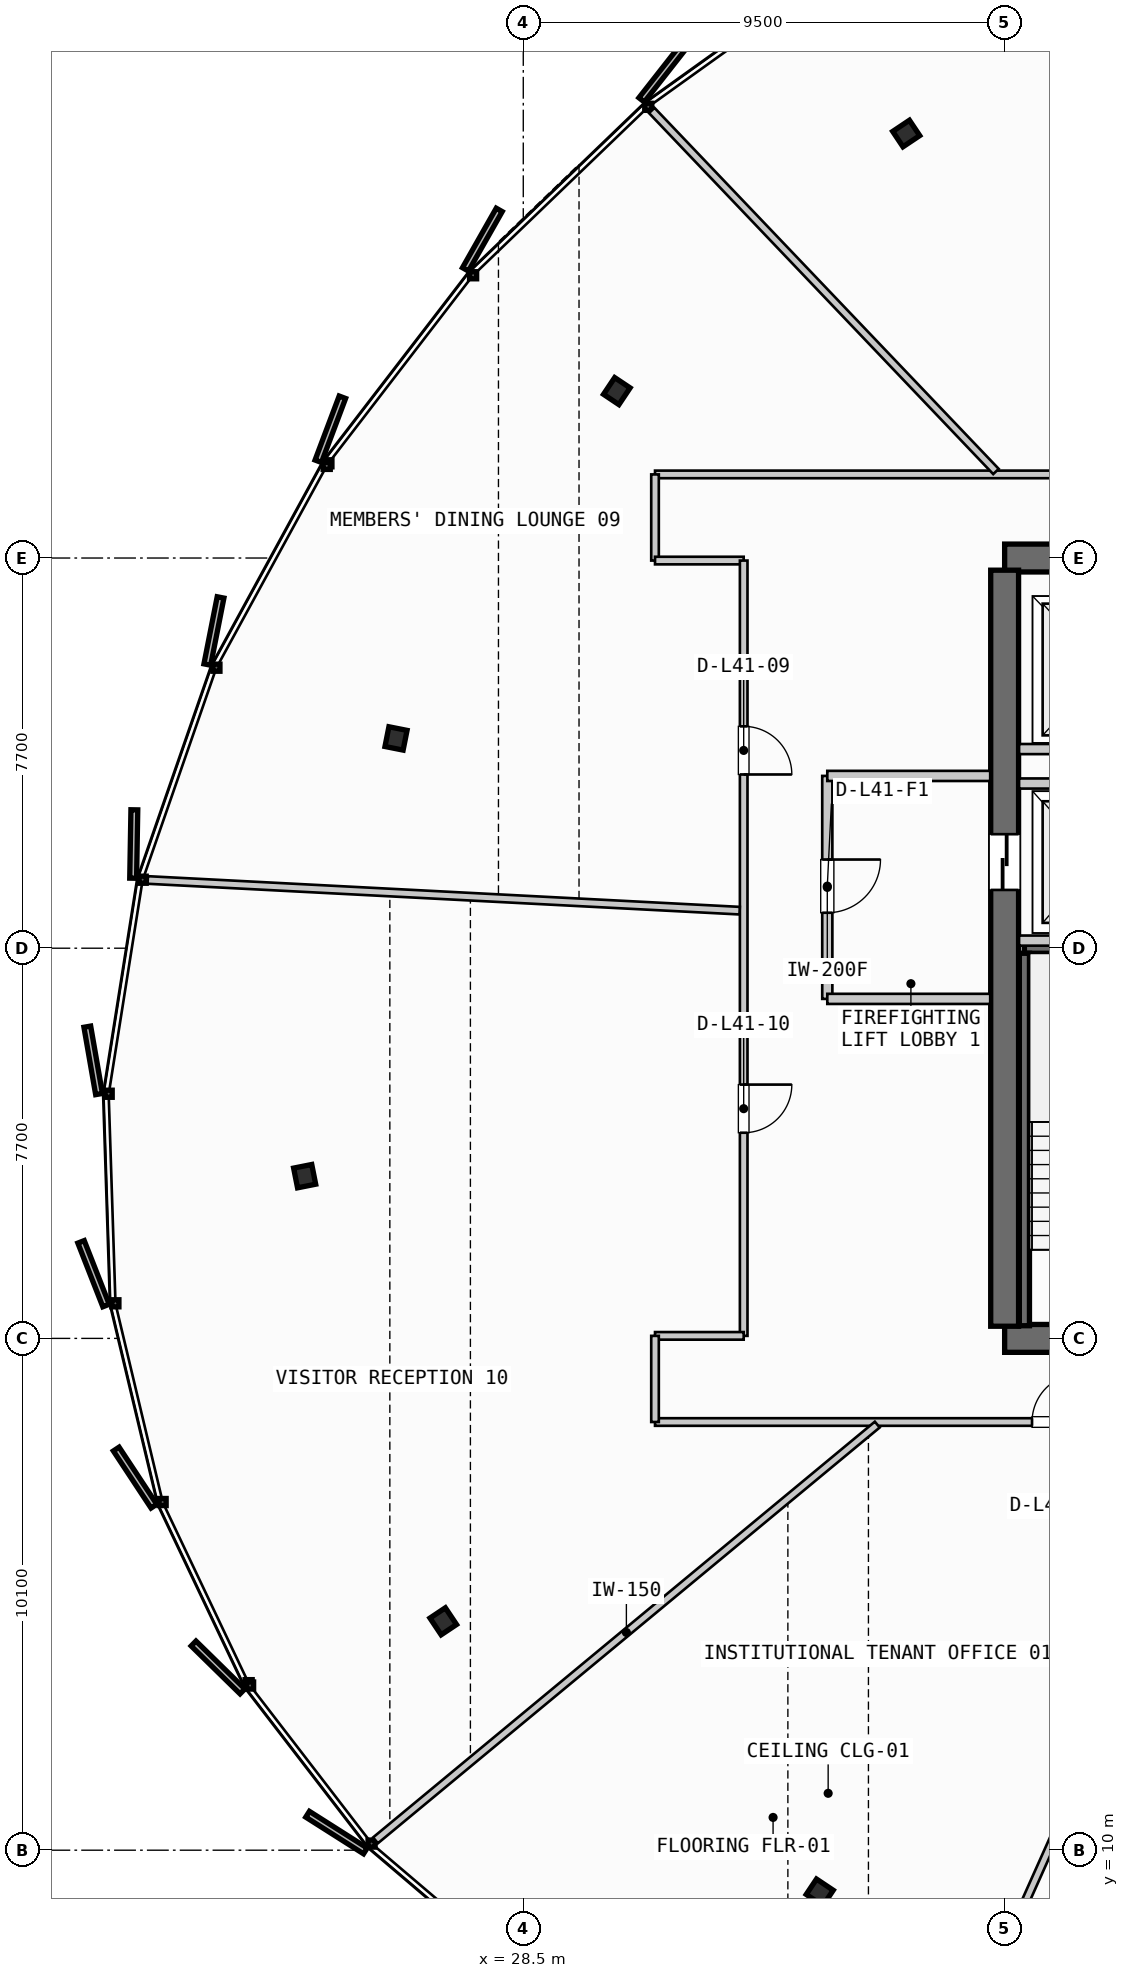
"""IFC4 building model, lengths in metres.
Left out: names, types, materials, properties, quantities, classifications, styles, units other than length and angle.
Written with IfcOpenShell. Run it as: python <this file> out.ifc"""

import sys

from ifc_helpers import new_model, si_unit, direction, frame, frame_2d, origin, origin_2d, place, context, subcontext, project, spatial, rectangle, i_section, extrude, source, transform, mapped, element, fill, save


model = new_model("IFC4")
c1 = context("Model", 3, precision=1e-05, world=origin(), true_north=direction((0.0, 1.0)))
c2 = subcontext(c1, "Body", "Model", "MODEL_VIEW")
j1 = project(units=[si_unit("LENGTHUNIT", "METRE"), si_unit("PLANEANGLEUNIT", "RADIAN")], contexts=[c1])
p1 = place(None, origin())
s1 = spatial("IfcSite", under=j1, at=p1, CompositionType="ELEMENT")
p2 = place(p1, origin())
s2 = spatial("IfcBuilding", under=s1, at=p2, CompositionType="ELEMENT")
p3 = place(p2, frame((0.0, 0.0, 160.75)))
s3 = spatial("IfcBuildingStorey", under=s2, at=p3, CompositionType="ELEMENT", Elevation=160.75)
p4 = place(p3, frame((38.0, 20.1, 0.0), z_axis=(0.0, 0.0, 1.0), x_axis=(1.0, 0.0, 0.0)))
e1 = element("IfcWall", 1, at=p4, inside=s3, PredefinedType="SHEAR", context=c2, shape_type="SweptSolid", body=[
    extrude(rectangle(XDim=17.6, YDim=0.55, at=frame_2d((8.8, 0.0))), origin(), (0.0, 0.0, 1.0), 3.3),
])
p5 = place(p4, frame((1.4, 0.0, 0.0)))
e2 = element("IfcOpeningElement", 2, at=p5, cuts=e1, PredefinedType="OPENING", context=c2, shape_type="SweptSolid", body=[
    extrude(rectangle(XDim=1.05, YDim=2.15, at=frame_2d((0.525, 1.075))), frame((0.0, 0.285, 0.0), z_axis=(0.0, -1.0, 0.0), x_axis=(1.0, 0.0, 0.0)), (0.0, 0.0, 1.0), 0.57),
])
p6 = place(p4, frame((15.15, 0.0, 0.0)))
e3 = element("IfcOpeningElement", 3, at=p6, cuts=e1, PredefinedType="OPENING", context=c2, shape_type="SweptSolid", body=[
    extrude(rectangle(XDim=1.05, YDim=2.15, at=frame_2d((0.525, 1.075))), frame((0.0, 0.285, 0.0), z_axis=(0.0, -1.0, 0.0), x_axis=(1.0, 0.0, 0.0)), (0.0, 0.0, 1.0), 0.57),
])
p7 = place(p4, frame((5.25, 0.0, 0.0)))
e4 = element("IfcOpeningElement", 4, at=p7, cuts=e1, PredefinedType="OPENING", context=c2, shape_type="SweptSolid", body=[
    extrude(rectangle(XDim=0.95, YDim=2.15, at=frame_2d((0.475, 1.075))), frame((0.0, 0.285, 0.0), z_axis=(0.0, -1.0, 0.0), x_axis=(1.0, 0.0, 0.0)), (0.0, 0.0, 1.0), 0.57),
])
p8 = place(p4, frame((11.4, 0.0, 0.0)))
e5 = element("IfcOpeningElement", 5, at=p8, cuts=e1, PredefinedType="OPENING", context=c2, shape_type="SweptSolid", body=[
    extrude(rectangle(XDim=0.95, YDim=2.15, at=frame_2d((0.475, 1.075))), frame((0.0, 0.285, 0.0), z_axis=(0.0, -1.0, 0.0), x_axis=(1.0, 0.0, 0.0)), (0.0, 0.0, 1.0), 0.57),
])
p9 = place(p3, frame((55.6, 35.5, 0.0), z_axis=(0.0, 0.0, 1.0), x_axis=(-1.0, 0.0, 0.0)))
e6 = element("IfcWall", 6, at=p9, inside=s3, PredefinedType="SHEAR", context=c2, shape_type="SweptSolid", body=[
    extrude(rectangle(XDim=17.6, YDim=0.55, at=frame_2d((8.8, 0.0))), origin(), (0.0, 0.0, 1.0), 3.3),
])
p10 = place(p9, frame((8.05, 0.0, 0.0)))
e7 = element("IfcOpeningElement", 7, at=p10, cuts=e6, PredefinedType="OPENING", context=c2, shape_type="SweptSolid", body=[
    extrude(rectangle(XDim=1.5, YDim=2.2, at=frame_2d((0.75, 1.1))), frame((0.0, 0.285, 0.0), z_axis=(0.0, -1.0, 0.0), x_axis=(1.0, 0.0, 0.0)), (0.0, 0.0, 1.0), 0.57),
])
p11 = place(p9, frame((14.95, 0.0, 0.0)))
e8 = element("IfcOpeningElement", 8, at=p11, cuts=e6, PredefinedType="OPENING", context=c2, shape_type="SweptSolid", body=[
    extrude(rectangle(XDim=1.4, YDim=2.3, at=frame_2d((0.7, 1.15))), frame((0.0, 0.285, 0.0), z_axis=(0.0, -1.0, 0.0), x_axis=(1.0, 0.0, 0.0)), (0.0, 0.0, 1.0), 0.57),
])
p12 = place(p9, frame((12.6, 0.0, 0.0)))
e9 = element("IfcOpeningElement", 9, at=p12, cuts=e6, PredefinedType="OPENING", context=c2, shape_type="SweptSolid", body=[
    extrude(rectangle(XDim=0.95, YDim=2.15, at=frame_2d((0.475, 1.075))), frame((0.0, 0.285, 0.0), z_axis=(0.0, -1.0, 0.0), x_axis=(1.0, 0.0, 0.0)), (0.0, 0.0, 1.0), 0.57),
])
p13 = place(p9, frame((10.45, 0.0, 0.0)))
e10 = element("IfcOpeningElement", 10, at=p13, cuts=e6, PredefinedType="OPENING", context=c2, shape_type="SweptSolid", body=[
    extrude(rectangle(XDim=0.95, YDim=2.15, at=frame_2d((0.475, 1.075))), frame((0.0, 0.285, 0.0), z_axis=(0.0, -1.0, 0.0), x_axis=(1.0, 0.0, 0.0)), (0.0, 0.0, 1.0), 0.57),
])
p14 = place(p3, frame((38.0, 35.26, 0.0), z_axis=(0.0, 0.0, 1.0), x_axis=(0.0, -1.0, 0.0)))
e11 = element("IfcWall", 11, at=p14, inside=s3, PredefinedType="SHEAR", context=c2, shape_type="SweptSolid", body=[
    extrude(rectangle(XDim=14.92, YDim=0.55, at=frame_2d((7.46, 0.0))), origin(), (0.0, 0.0, 1.0), 3.3),
])
p15 = place(p14, frame((5.21, 0.0, 0.0)))
e12 = element("IfcOpeningElement", 12, at=p15, cuts=e11, PredefinedType="OPENING", context=c2, shape_type="SweptSolid", body=[
    extrude(rectangle(XDim=1.1, YDim=2.2, at=frame_2d((0.55, 1.1))), frame((0.0, 0.285, 0.0), z_axis=(0.0, -1.0, 0.0), x_axis=(1.0, 0.0, 0.0)), (0.0, 0.0, 1.0), 0.57),
])
m1 = source(origin(), c2, "Body", "SweptSolid", [
    extrude(i_section(OverallWidth=0.397, OverallDepth=0.365, WebThickness=0.028, FlangeThickness=0.044, FilletRadius=0.015, at=origin_2d()), origin(), (0.0, 0.0, 1.0), 3.3),
])
for number, where, z_axis, x_axis in (
    (13, (36.058, 43.877, 0.0), (0.0, 0.0, 1.0), (-0.556, 0.831, 0.0)),
    (14, (30.346, 38.794, 0.0), (0.0, 0.0, 1.0), (-0.831, 0.556, 0.0)),
    (15, (25.989, 31.94, 0.0), (0.0, 0.0, 1.0), (-0.981, 0.195, 0.0)),
    (16, (24.185, 23.302, 0.0), (0.0, 0.0, 1.0), (-0.981, -0.195, 0.0)),
    (17, (26.921, 14.517, 0.0), (0.0, 0.0, 1.0), (-0.831, -0.556, 0.0)),
    (18, (34.351, 9.168, 0.0), (0.0, 0.0, 1.0), (-0.556, -0.831, 0.0)),
):
    element("IfcColumn", number, at=place(p3, frame(where, z_axis=z_axis, x_axis=x_axis)), inside=s3, PredefinedType="COLUMN", context=c2, shape_type="MappedRepresentation", body=[
        mapped(m1, transform((0.0, 0.0, 0.0), scale=1.0)),
    ])
p16 = place(p3, frame((38.39, 27.8, 0.0), z_axis=(0.0, 0.0, 1.0), x_axis=(1.0, 0.0, 0.0)))
e19 = element("IfcWall", 19, at=p16, inside=s3, PredefinedType="SHEAR", context=c2, shape_type="SweptSolid", body=[
    extrude(rectangle(XDim=3.06, YDim=0.2, at=frame_2d((1.53, 0.0))), origin(), (0.0, 0.0, 1.0), 3.3),
])
p17 = place(p3, frame((38.39, 20.35, 0.0), z_axis=(0.0, 0.0, 1.0), x_axis=(0.0, 1.0, 0.0)))
e20 = element("IfcWall", 20, at=p17, inside=s3, PredefinedType="SHEAR", context=c2, shape_type="SweptSolid", body=[
    extrude(rectangle(XDim=7.35, YDim=0.2, at=frame_2d((3.675, 0.0))), origin(), (0.0, 0.0, 1.0), 3.3),
])
for number, where, z_axis, x_axis in (
    (21, (38.285, 27.95, 0.0), (0.0, 0.0, 1.0), (1.0, 0.0, 0.0)),
    (22, (38.285, 31.05, 0.0), (0.0, 0.0, 1.0), (1.0, 0.0, 0.0)),
):
    element("IfcWall", number, at=place(p3, frame(where, z_axis=z_axis, x_axis=x_axis)), inside=s3, PredefinedType="PARTITIONING", context=c2, shape_type="SweptSolid", body=[
        extrude(rectangle(XDim=2.865, YDim=0.2, at=frame_2d((1.433, 0.0))), origin(), (0.0, 0.0, 1.0), 2.28),
    ])
p18 = place(p3, frame((34.5, 31.2, 0.0), z_axis=(0.0, 0.0, 1.0), x_axis=(0.0, -1.0, 0.0)))
e23 = element("IfcWall", 23, at=p18, inside=s3, PredefinedType="PARTITIONING", context=c2, shape_type="SweptSolid", body=[
    extrude(rectangle(XDim=4.4, YDim=0.2, at=frame_2d((2.2, 0.0))), origin(), (0.0, 0.0, 1.0), 2.28),
])
p19 = place(p18, frame((1.65, 0.0, 0.0)))
e24 = element("IfcOpeningElement", 24, at=p19, cuts=e23, PredefinedType="OPENING", context=c2, shape_type="SweptSolid", body=[
    extrude(rectangle(XDim=1.05, YDim=2.15, at=frame_2d((0.525, 1.075))), frame((0.0, 0.11, 0.0), z_axis=(0.0, -1.0, 0.0), x_axis=(1.0, 0.0, 0.0)), (0.0, 0.0, 1.0), 0.22),
])
for number, where, z_axis, x_axis in (
    (25, (34.5, 26.8, 0.0), (0.0, 0.0, 1.0), (1.0, 0.0, 0.0)),
    (26, (34.5, 31.2, 0.0), (0.0, 0.0, 1.0), (1.0, 0.0, 0.0)),
):
    element("IfcWall", number, at=place(p3, frame(where, z_axis=z_axis, x_axis=x_axis)), inside=s3, PredefinedType="PARTITIONING", context=c2, shape_type="SweptSolid", body=[
        extrude(rectangle(XDim=3.215, YDim=0.2, at=frame_2d((1.607, 0.0))), origin(), (0.0, 0.0, 1.0), 2.28),
    ])
p20 = place(p3, frame((38.285, 31.73, 0.0), z_axis=(0.0, 0.0, 1.0), x_axis=(1.0, 0.0, 0.0)))
e27 = element("IfcWall", 27, at=p20, inside=s3, PredefinedType="PARTITIONING", context=c2, shape_type="SweptSolid", body=[
    extrude(rectangle(XDim=7.515, YDim=0.2, at=frame_2d((3.758, 0.0))), origin(), (0.0, 0.0, 1.0), 2.28),
])
p21 = place(p3, frame((31.1, 18.45, 0.0), z_axis=(0.0, 0.0, 1.0), x_axis=(1.0, 0.0, 0.0)))
e28 = element("IfcWall", 28, at=p21, inside=s3, PredefinedType="PARTITIONING", context=c2, shape_type="SweptSolid", body=[
    extrude(rectangle(XDim=31.4, YDim=0.15, at=frame_2d((15.7, 0.0))), origin(), (0.0, 0.0, 1.0), 2.28),
])
p22 = place(p21, frame((7.441, 0.0, 0.0)))
e29 = element("IfcOpeningElement", 29, at=p22, cuts=e28, PredefinedType="OPENING", context=c2, shape_type="SweptSolid", body=[
    extrude(rectangle(XDim=0.95, YDim=2.15, at=frame_2d((0.475, 1.075))), frame((0.0, 0.085, 0.0), z_axis=(0.0, -1.0, 0.0), x_axis=(1.0, 0.0, 0.0)), (0.0, 0.0, 1.0), 0.17),
])
p23 = place(p21, frame((14.784, 0.0, 0.0)))
e30 = element("IfcOpeningElement", 30, at=p23, cuts=e28, PredefinedType="OPENING", context=c2, shape_type="SweptSolid", body=[
    extrude(rectangle(XDim=0.95, YDim=2.15, at=frame_2d((0.475, 1.075))), frame((0.0, 0.085, 0.0), z_axis=(0.0, -1.0, 0.0), x_axis=(1.0, 0.0, 0.0)), (0.0, 0.0, 1.0), 0.17),
])
p24 = place(p21, frame((21.401, 0.0, 0.0)))
e31 = element("IfcOpeningElement", 31, at=p24, cuts=e28, PredefinedType="OPENING", context=c2, shape_type="SweptSolid", body=[
    extrude(rectangle(XDim=0.95, YDim=2.15, at=frame_2d((0.475, 1.075))), frame((0.0, 0.085, 0.0), z_axis=(0.0, -1.0, 0.0), x_axis=(1.0, 0.0, 0.0)), (0.0, 0.0, 1.0), 0.17),
])
p25 = place(p3, frame((62.5, 37.15, 0.0), z_axis=(0.0, 0.0, 1.0), x_axis=(-1.0, 0.0, 0.0)))
e32 = element("IfcWall", 32, at=p25, inside=s3, PredefinedType="PARTITIONING", context=c2, shape_type="SweptSolid", body=[
    extrude(rectangle(XDim=31.4, YDim=0.15, at=frame_2d((15.7, 0.0))), origin(), (0.0, 0.0, 1.0), 2.28),
])
p26 = place(p25, frame((7.917, 0.0, 0.0)))
e33 = element("IfcOpeningElement", 33, at=p26, cuts=e32, PredefinedType="OPENING", context=c2, shape_type="SweptSolid", body=[
    extrude(rectangle(XDim=0.95, YDim=2.15, at=frame_2d((0.475, 1.075))), frame((0.0, 0.085, 0.0), z_axis=(0.0, -1.0, 0.0), x_axis=(1.0, 0.0, 0.0)), (0.0, 0.0, 1.0), 0.17),
])
p27 = place(p25, frame((18.354, 0.0, 0.0)))
e34 = element("IfcOpeningElement", 34, at=p27, cuts=e32, PredefinedType="OPENING", context=c2, shape_type="SweptSolid", body=[
    extrude(rectangle(XDim=0.95, YDim=2.15, at=frame_2d((0.475, 1.075))), frame((0.0, 0.085, 0.0), z_axis=(0.0, -1.0, 0.0), x_axis=(1.0, 0.0, 0.0)), (0.0, 0.0, 1.0), 0.17),
])
p28 = place(p3, frame((31.1, 37.15, 0.0), z_axis=(0.0, 0.0, 1.0), x_axis=(0.0, -1.0, 0.0)))
e35 = element("IfcWall", 35, at=p28, inside=s3, PredefinedType="PARTITIONING", context=c2, shape_type="SweptSolid", body=[
    extrude(rectangle(XDim=1.7, YDim=0.15, at=frame_2d((0.85, 0.0))), origin(), (0.0, 0.0, 1.0), 2.28),
])
p29 = place(p3, frame((31.1, 35.45, 0.0), z_axis=(0.0, 0.0, 1.0), x_axis=(1.0, 0.0, 0.0)))
e36 = element("IfcWall", 36, at=p29, inside=s3, PredefinedType="PARTITIONING", context=c2, shape_type="SweptSolid", body=[
    extrude(rectangle(XDim=1.75, YDim=0.15, at=frame_2d((0.875, 0.0))), origin(), (0.0, 0.0, 1.0), 2.28),
])
p30 = place(p3, frame((32.85, 35.45, 0.0), z_axis=(0.0, 0.0, 1.0), x_axis=(0.0, -1.0, 0.0)))
e37 = element("IfcWall", 37, at=p30, inside=s3, PredefinedType="PARTITIONING", context=c2, shape_type="SweptSolid", body=[
    extrude(rectangle(XDim=15.3, YDim=0.15, at=frame_2d((7.65, 0.0))), origin(), (0.0, 0.0, 1.0), 2.28),
])
p31 = place(p30, frame((3.271, 0.0, 0.0)))
e38 = element("IfcOpeningElement", 38, at=p31, cuts=e37, PredefinedType="OPENING", context=c2, shape_type="SweptSolid", body=[
    extrude(rectangle(XDim=0.95, YDim=2.15, at=frame_2d((0.475, 1.075))), frame((0.0, 0.085, 0.0), z_axis=(0.0, -1.0, 0.0), x_axis=(1.0, 0.0, 0.0)), (0.0, 0.0, 1.0), 0.17),
])
p32 = place(p30, frame((10.341, 0.0, 0.0)))
e39 = element("IfcOpeningElement", 39, at=p32, cuts=e37, PredefinedType="OPENING", context=c2, shape_type="SweptSolid", body=[
    extrude(rectangle(XDim=0.95, YDim=2.15, at=frame_2d((0.475, 1.075))), frame((0.0, 0.085, 0.0), z_axis=(0.0, -1.0, 0.0), x_axis=(1.0, 0.0, 0.0)), (0.0, 0.0, 1.0), 0.17),
])
p33 = place(p3, frame((32.85, 20.15, 0.0), z_axis=(0.0, 0.0, 1.0), x_axis=(-1.0, 0.0, 0.0)))
e40 = element("IfcWall", 40, at=p33, inside=s3, PredefinedType="PARTITIONING", context=c2, shape_type="SweptSolid", body=[
    extrude(rectangle(XDim=1.75, YDim=0.15, at=frame_2d((0.875, 0.0))), origin(), (0.0, 0.0, 1.0), 2.28),
])
p34 = place(p3, frame((31.1, 20.15, 0.0), z_axis=(0.0, 0.0, 1.0), x_axis=(0.0, -1.0, 0.0)))
e41 = element("IfcWall", 41, at=p34, inside=s3, PredefinedType="PARTITIONING", context=c2, shape_type="SweptSolid", body=[
    extrude(rectangle(XDim=1.7, YDim=0.15, at=frame_2d((0.85, 0.0))), origin(), (0.0, 0.0, 1.0), 2.28),
])
p35 = place(p3, frame((35.486, 18.399, 0.0), z_axis=(0.0, 0.0, 1.0), x_axis=(-0.770045010615, -0.637989562318, 0.0)))
e42 = element("IfcWall", 42, at=p35, inside=s3, PredefinedType="PARTITIONING", context=c2, shape_type="SweptSolid", body=[
    extrude(rectangle(XDim=12.86, YDim=0.15, at=frame_2d((6.43, 0.0))), origin(), (0.0, 0.0, 1.0), 2.28),
])
p36 = place(p3, frame((42.609, 18.377, 0.0), z_axis=(0.0, 0.0, 1.0), x_axis=(-0.408157987145, -0.912911308688, 0.0)))
e43 = element("IfcWall", 43, at=p36, inside=s3, PredefinedType="PARTITIONING", context=c2, shape_type="SweptSolid", body=[
    extrude(rectangle(XDim=15.438, YDim=0.15, at=frame_2d((7.719, 0.0))), origin(), (0.0, 0.0, 1.0), 2.28),
])
p37 = place(p3, frame((37.829, 37.208, 0.0), z_axis=(0.0, 0.0, 1.0), x_axis=(-0.690078052701, 0.723734952299, 0.0)))
e44 = element("IfcWall", 44, at=p37, inside=s3, PredefinedType="PARTITIONING", context=c2, shape_type="SweptSolid", body=[
    extrude(rectangle(XDim=9.844, YDim=0.15, at=frame_2d((4.922, 0.0))), origin(), (0.0, 0.0, 1.0), 2.28),
])
p38 = place(p3, frame((32.77, 28.541, 0.0), z_axis=(0.0, 0.0, 1.0), x_axis=(-0.998659484512, 0.051761317539, 0.0)))
e45 = element("IfcWall", 45, at=p38, inside=s3, PredefinedType="PARTITIONING", context=c2, shape_type="SweptSolid", body=[
    extrude(rectangle(XDim=11.697, YDim=0.15, at=frame_2d((5.849, 0.0))), origin(), (0.0, 0.0, 1.0), 2.28),
])
m2 = source(origin(), c2, "Body", "SweptSolid", [
    extrude(rectangle(XDim=1.1, YDim=2.2, at=frame_2d((0.55, 1.1))), frame((0.0, 0.025, 0.0), z_axis=(0.0, -1.0, 0.0), x_axis=(1.0, 0.0, 0.0)), (0.0, 0.0, 1.0), 0.05),
])
p39 = place(p15, origin())
e46 = element("IfcDoor", 46, at=p39, inside=s3, OperationType="SLIDING_TO_LEFT", PredefinedType="DOOR", context=c2, shape_type="MappedRepresentation", body=[
    mapped(m2, transform((0.0, 0.0, 0.0), scale=1.0)),
])
fill(e12, e46)
m3 = source(origin(), c2, "Body", "SweptSolid", [
    extrude(rectangle(XDim=1.05, YDim=2.15, at=frame_2d((0.525, 1.075))), frame((0.0, 0.025, 0.0), z_axis=(0.0, -1.0, 0.0), x_axis=(1.0, 0.0, 0.0)), (0.0, 0.0, 1.0), 0.05),
])
p40 = place(p19, origin())
e47 = element("IfcDoor", 47, at=p40, inside=s3, OperationType="SINGLE_SWING_LEFT", PredefinedType="DOOR", context=c2, shape_type="MappedRepresentation", body=[
    mapped(m3, transform((0.0, 0.0, 0.0), scale=1.0)),
])
fill(e24, e47)
m4 = source(origin(), c2, "Body", "SweptSolid", [
    extrude(rectangle(XDim=0.95, YDim=2.15, at=frame_2d((0.475, 1.075))), frame((0.0, 0.025, 0.0), z_axis=(0.0, -1.0, 0.0), x_axis=(1.0, 0.0, 0.0)), (0.0, 0.0, 1.0), 0.05),
])
p41 = place(p22, origin())
e48 = element("IfcDoor", 48, at=p41, inside=s3, OperationType="SINGLE_SWING_RIGHT", PredefinedType="DOOR", context=c2, shape_type="MappedRepresentation", body=[
    mapped(m4, transform((0.0, 0.0, 0.0), scale=1.0)),
])
fill(e29, e48)
p42 = place(p31, origin())
e49 = element("IfcDoor", 49, at=p42, inside=s3, OperationType="SINGLE_SWING_RIGHT", PredefinedType="DOOR", context=c2, shape_type="MappedRepresentation", body=[
    mapped(m4, transform((0.0, 0.0, 0.0), scale=1.0)),
])
fill(e38, e49)
p43 = place(p32, origin())
e50 = element("IfcDoor", 50, at=p43, inside=s3, OperationType="SINGLE_SWING_LEFT", PredefinedType="DOOR", context=c2, shape_type="MappedRepresentation", body=[
    mapped(m4, transform((0.0, 0.0, 0.0), scale=1.0)),
])
fill(e39, e50)
save(model, sys.argv[1])
